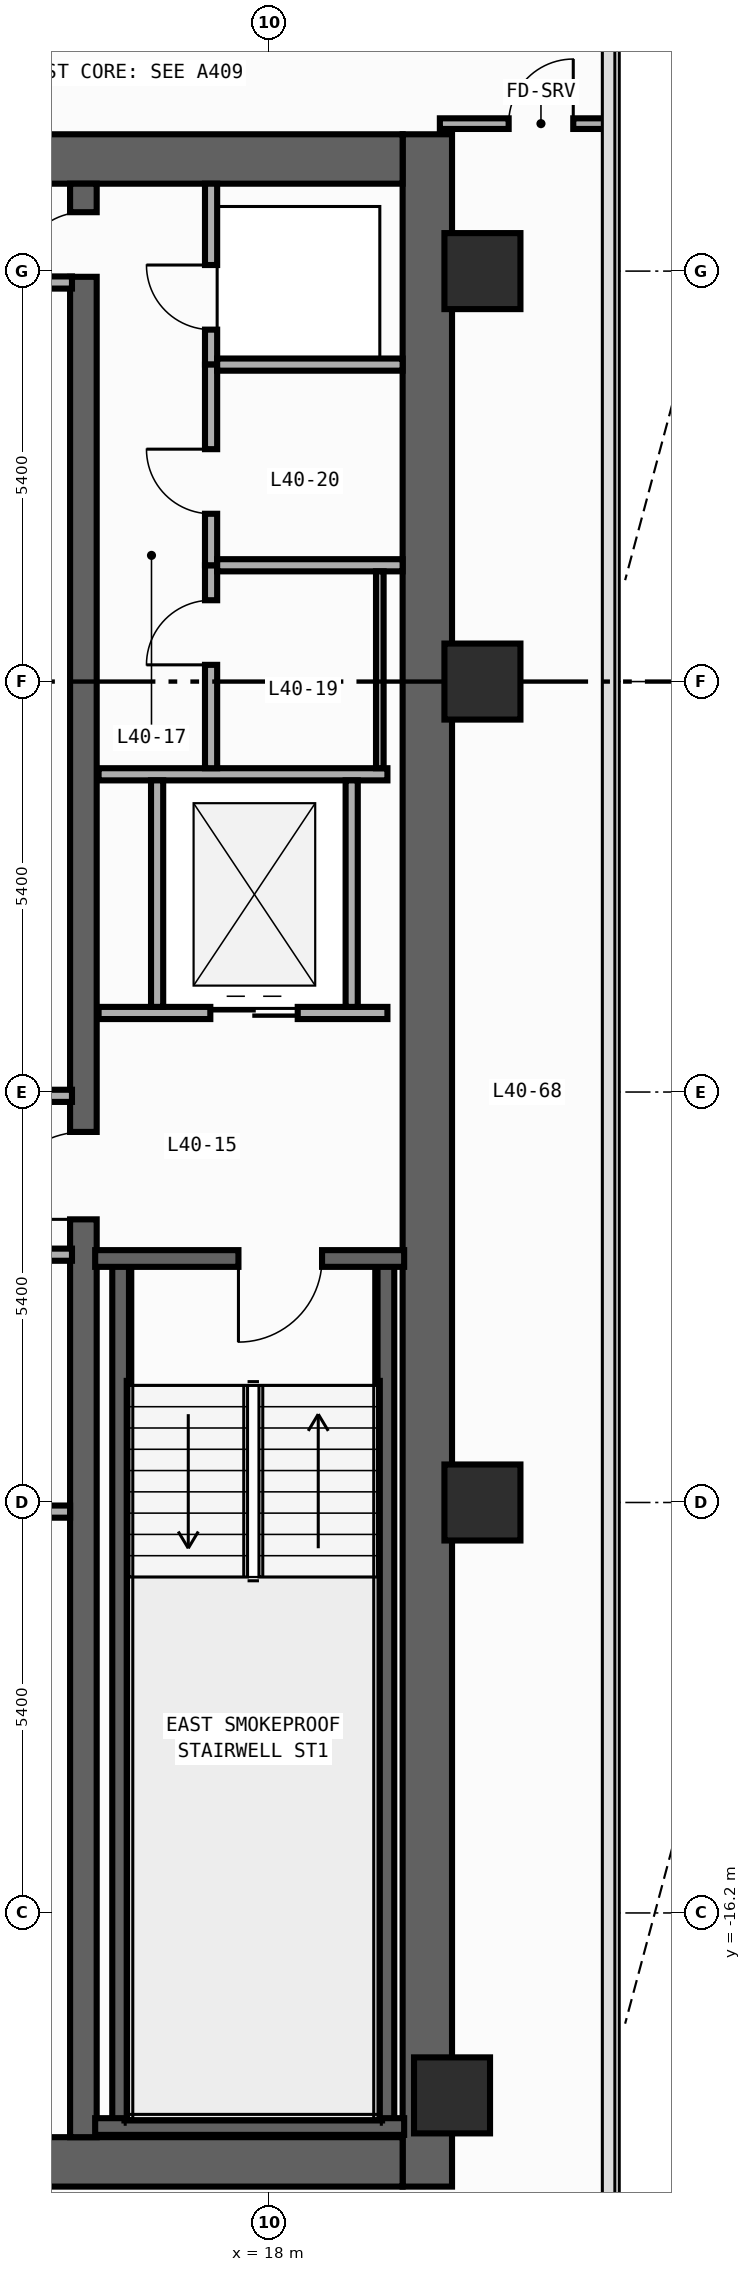
"""IFC4 building model, lengths in metres.
Left out: names, types, materials, properties, quantities, classifications, styles, units other than length and angle.
Written with IfcOpenShell. Run it as: python <this file> out.ifc"""

import sys

from ifc_helpers import new_model, si_unit, direction, frame, frame_2d, origin, origin_2d, place, context, subcontext, project, spatial, rectangle, extrude, element, fill, save


model = new_model("IFC4")
c1 = context("Model", 3, precision=1e-05, world=origin(), true_north=direction((0.0, 1.0)))
c2 = subcontext(c1, "Body", "Model", "MODEL_VIEW")
j1 = project(units=[si_unit("LENGTHUNIT", "METRE"), si_unit("PLANEANGLEUNIT", "RADIAN")], contexts=[c1])
p1 = place(None, origin())
s1 = spatial("IfcSite", under=j1, at=p1, CompositionType="ELEMENT")
p2 = place(p1, origin())
s2 = spatial("IfcBuilding", under=s1, at=p2, CompositionType="ELEMENT")
p3 = place(p2, frame((0.0, 0.0, 176.4)))
s3 = spatial("IfcBuildingStorey", under=s2, at=p3, CompositionType="ELEMENT", Elevation=176.4)
p4 = place(p3, frame((20.075, -19.8, 0.0), z_axis=(0.0, 0.0, 1.0), x_axis=(0.0, 1.0, 0.0)))
e1 = element("IfcWall", 1, at=p4, inside=s3, PredefinedType="SHEAR", context=c2, shape_type="SweptSolid", body=[
    extrude(rectangle(XDim=27.0, YDim=0.65, at=frame_2d((13.5, 0.0))), origin(), (0.0, 0.0, 1.0), 3.54),
])
for number, where, z_axis, x_axis in (
    (2, (12.65, -19.475, 0.0), (0.0, 0.0, 1.0), (1.0, 0.0, 0.0)),
    (3, (12.65, 6.875, 0.0), (0.0, 0.0, 1.0), (1.0, 0.0, 0.0)),
):
    element("IfcWall", number, at=place(p3, frame(where, z_axis=z_axis, x_axis=x_axis)), inside=s3, PredefinedType="SHEAR", context=c2, shape_type="SweptSolid", body=[
        extrude(rectangle(XDim=7.1, YDim=0.65, at=frame_2d((3.55, 0.0))), origin(), (0.0, 0.0, 1.0), 3.54),
    ])
p5 = place(p3, frame((15.55, -19.15, 0.0), z_axis=(0.0, 0.0, 1.0), x_axis=(0.0, 1.0, 0.0)))
e4 = element("IfcWall", 4, at=p5, inside=s3, PredefinedType="SHEAR", context=c2, shape_type="SweptSolid", body=[
    extrude(rectangle(XDim=25.7, YDim=0.35, at=frame_2d((12.85, 0.0))), origin(), (0.0, 0.0, 1.0), 3.54),
])
p6 = place(p5, frame((12.075, 0.0, 0.0)))
e5 = element("IfcOpeningElement", 5, at=p6, cuts=e4, PredefinedType="OPENING", context=c2, shape_type="SweptSolid", body=[
    extrude(rectangle(XDim=1.15, YDim=2.2, at=frame_2d((0.575, 1.1))), frame((0.0, 0.185, 0.0), z_axis=(0.0, -1.0, 0.0), x_axis=(1.0, 0.0, 0.0)), (0.0, 0.0, 1.0), 0.37),
])
p7 = place(p5, frame((24.475, 0.0, 0.0)))
e6 = element("IfcOpeningElement", 6, at=p7, cuts=e4, PredefinedType="OPENING", context=c2, shape_type="SweptSolid", body=[
    extrude(rectangle(XDim=0.85, YDim=2.1, at=frame_2d((0.425, 1.05))), frame((0.0, 0.185, 0.0), z_axis=(0.0, -1.0, 0.0), x_axis=(1.0, 0.0, 0.0)), (0.0, 0.0, 1.0), 0.37),
])
for number, where, z_axis, x_axis in (
    (7, (16.04, -19.01, 0.0), (0.0, 0.0, 1.0), (0.0, 1.0, 0.0)),
    (8, (19.53, -19.01, 0.0), (0.0, 0.0, 1.0), (0.0, 1.0, 0.0)),
):
    element("IfcWall", number, at=place(p3, frame(where, z_axis=z_axis, x_axis=x_axis)), inside=s3, PredefinedType="SHEAR", context=c2, shape_type="SweptSolid", body=[
        extrude(rectangle(XDim=11.42, YDim=0.22, at=frame_2d((5.71, 0.0))), origin(), (0.0, 0.0, 1.0), 3.54),
    ])
p8 = place(p3, frame((15.705, -19.01, 0.0), z_axis=(0.0, 0.0, 1.0), x_axis=(1.0, 0.0, 0.0)))
e9 = element("IfcWall", 9, at=p8, inside=s3, PredefinedType="SHEAR", context=c2, shape_type="SweptSolid", body=[
    extrude(rectangle(XDim=4.065, YDim=0.22, at=frame_2d((2.032, 0.0))), origin(), (0.0, 0.0, 1.0), 3.54),
])
p9 = place(p3, frame((19.77, -7.59, 0.0), z_axis=(0.0, 0.0, 1.0), x_axis=(-1.0, 0.0, 0.0)))
e10 = element("IfcWall", 10, at=p9, inside=s3, PredefinedType="SHEAR", context=c2, shape_type="SweptSolid", body=[
    extrude(rectangle(XDim=4.065, YDim=0.22, at=frame_2d((2.032, 0.0))), origin(), (0.0, 0.0, 1.0), 3.54),
])
p10 = place(p9, frame((1.08, 0.0, 0.0)))
e11 = element("IfcOpeningElement", 11, at=p10, cuts=e10, PredefinedType="OPENING", context=c2, shape_type="SweptSolid", body=[
    extrude(rectangle(XDim=1.1, YDim=2.2, at=frame_2d((0.55, 1.1))), frame((0.0, 0.12, 0.0), z_axis=(0.0, -1.0, 0.0), x_axis=(1.0, 0.0, 0.0)), (0.0, 0.0, 1.0), 0.24),
])
for number, where, z_axis, x_axis in (
    (12, (20.4, -18.6, 0.0), (0.0, 0.0, 1.0), (1.0, 0.0, 0.0)),
    (13, (20.8, -10.8, 0.0), (0.0, 0.0, 1.0), (1.0, 0.0, 0.0)),
    (14, (20.8, 0.0, 0.0), (0.0, 0.0, 1.0), (1.0, 0.0, 0.0)),
    (15, (20.8, 5.4, 0.0), (0.0, 0.0, 1.0), (1.0, 0.0, 0.0)),
):
    element("IfcColumn", number, at=place(p3, frame(where, z_axis=z_axis, x_axis=x_axis)), inside=s3, PredefinedType="COLUMN", context=c2, shape_type="SweptSolid", body=[
        extrude(rectangle(XDim=1.0, YDim=1.0, at=origin_2d()), origin(), (0.0, 0.0, 1.0), 3.8),
    ])
p11 = place(p3, frame((15.75, -4.36, 0.0), z_axis=(0.0, 0.0, 1.0), x_axis=(1.0, 0.0, 0.0)))
e16 = element("IfcWall", 16, at=p11, inside=s3, PredefinedType="STANDARD", context=c2, shape_type="SweptSolid", body=[
    extrude(rectangle(XDim=3.8, YDim=0.16, at=frame_2d((1.9, 0.0))), origin(), (0.0, 0.0, 1.0), 3.54),
])
p12 = place(p11, frame((1.47, 0.0, 0.0)))
e17 = element("IfcOpeningElement", 17, at=p12, cuts=e16, PredefinedType="OPENING", context=c2, shape_type="SweptSolid", body=[
    extrude(rectangle(XDim=1.15, YDim=2.2, at=frame_2d((0.575, 1.1))), frame((0.0, 0.09, 0.0), z_axis=(0.0, -1.0, 0.0), x_axis=(1.0, 0.0, 0.0)), (0.0, 0.0, 1.0), 0.18),
])
p13 = place(p3, frame((15.75, -1.22, 0.0), z_axis=(0.0, 0.0, 1.0), x_axis=(1.0, 0.0, 0.0)))
e18 = element("IfcWall", 18, at=p13, inside=s3, PredefinedType="STANDARD", context=c2, shape_type="SweptSolid", body=[
    extrude(rectangle(XDim=3.8, YDim=0.16, at=frame_2d((1.9, 0.0))), origin(), (0.0, 0.0, 1.0), 3.54),
])
for number, where, z_axis, x_axis in (
    (19, (16.52, -4.28, 0.0), (0.0, 0.0, 1.0), (0.0, 1.0, 0.0)),
    (20, (19.08, -4.28, 0.0), (0.0, 0.0, 1.0), (0.0, 1.0, 0.0)),
):
    element("IfcWall", number, at=place(p3, frame(where, z_axis=z_axis, x_axis=x_axis)), inside=s3, PredefinedType="STANDARD", context=c2, shape_type="SweptSolid", body=[
        extrude(rectangle(XDim=2.98, YDim=0.16, at=frame_2d((1.49, 0.0))), origin(), (0.0, 0.0, 1.0), 3.54),
    ])
for number, where, z_axis, x_axis in (
    (21, (12.8, -5.45, 0.0), (0.0, 0.0, 1.0), (1.0, 0.0, 0.0)),
    (22, (12.8, -7.54, 0.0), (0.0, 0.0, 1.0), (1.0, 0.0, 0.0)),
    (23, (12.8, 5.25, 0.0), (0.0, 0.0, 1.0), (1.0, 0.0, 0.0)),
):
    element("IfcWall", number, at=place(p3, frame(where, z_axis=z_axis, x_axis=x_axis)), inside=s3, PredefinedType="STANDARD", context=c2, shape_type="SweptSolid", body=[
        extrude(rectangle(XDim=2.6, YDim=0.16, at=frame_2d((1.3, 0.0))), origin(), (0.0, 0.0, 1.0), 3.54),
    ])
p14 = place(p3, frame((17.23, 4.17, 0.0), z_axis=(0.0, 0.0, 1.0), x_axis=(0.0, 1.0, 0.0)))
e24 = element("IfcWall", 24, at=p14, inside=s3, PredefinedType="PARTITIONING", context=c2, shape_type="SweptSolid", body=[
    extrude(rectangle(XDim=2.38, YDim=0.16, at=frame_2d((1.19, 0.0))), origin(), (0.0, 0.0, 1.0), 3.54),
])
p15 = place(p14, frame((0.46, 0.0, 0.0)))
e25 = element("IfcOpeningElement", 25, at=p15, cuts=e24, PredefinedType="OPENING", context=c2, shape_type="SweptSolid", body=[
    extrude(rectangle(XDim=0.85, YDim=2.1, at=frame_2d((0.425, 1.05))), frame((0.0, 0.09, 0.0), z_axis=(0.0, -1.0, 0.0), x_axis=(1.0, 0.0, 0.0)), (0.0, 0.0, 1.0), 0.18),
])
p16 = place(p3, frame((17.23, -1.14, 0.0), z_axis=(0.0, 0.0, 1.0), x_axis=(0.0, 1.0, 0.0)))
e26 = element("IfcWall", 26, at=p16, inside=s3, PredefinedType="PARTITIONING", context=c2, shape_type="SweptSolid", body=[
    extrude(rectangle(XDim=2.67, YDim=0.16, at=frame_2d((1.335, 0.0))), origin(), (0.0, 0.0, 1.0), 3.54),
])
p17 = place(p16, frame((1.36, 0.0, 0.0)))
e27 = element("IfcOpeningElement", 27, at=p17, cuts=e26, PredefinedType="OPENING", context=c2, shape_type="SweptSolid", body=[
    extrude(rectangle(XDim=0.85, YDim=2.1, at=frame_2d((0.425, 1.05))), frame((0.0, 0.09, 0.0), z_axis=(0.0, -1.0, 0.0), x_axis=(1.0, 0.0, 0.0)), (0.0, 0.0, 1.0), 0.18),
])
p18 = place(p3, frame((17.23, 1.53, 0.0), z_axis=(0.0, 0.0, 1.0), x_axis=(0.0, 1.0, 0.0)))
e28 = element("IfcWall", 28, at=p18, inside=s3, PredefinedType="PARTITIONING", context=c2, shape_type="SweptSolid", body=[
    extrude(rectangle(XDim=2.64, YDim=0.16, at=frame_2d((1.32, 0.0))), origin(), (0.0, 0.0, 1.0), 3.54),
])
p19 = place(p18, frame((0.677, 0.0, 0.0)))
e29 = element("IfcOpeningElement", 29, at=p19, cuts=e28, PredefinedType="OPENING", context=c2, shape_type="SweptSolid", body=[
    extrude(rectangle(XDim=0.85, YDim=2.1, at=frame_2d((0.425, 1.05))), frame((0.0, 0.09, 0.0), z_axis=(0.0, -1.0, 0.0), x_axis=(1.0, 0.0, 0.0)), (0.0, 0.0, 1.0), 0.18),
])
for number, where, z_axis, x_axis in (
    (30, (17.31, 4.17, 0.0), (0.0, 0.0, 1.0), (1.0, 0.0, 0.0)),
    (31, (17.31, 1.53, 0.0), (0.0, 0.0, 1.0), (1.0, 0.0, 0.0)),
):
    element("IfcWall", number, at=place(p3, frame(where, z_axis=z_axis, x_axis=x_axis)), inside=s3, PredefinedType="PARTITIONING", context=c2, shape_type="SweptSolid", body=[
        extrude(rectangle(XDim=2.44, YDim=0.16, at=frame_2d((1.22, 0.0))), origin(), (0.0, 0.0, 1.0), 3.54),
    ])
p20 = place(p3, frame((12.31, -10.92, 0.0), z_axis=(0.0, 0.0, 1.0), x_axis=(1.0, 0.0, 0.0)))
e32 = element("IfcWall", 32, at=p20, inside=s3, PredefinedType="PARTITIONING", context=c2, shape_type="SweptSolid", body=[
    extrude(rectangle(XDim=3.065, YDim=0.16, at=frame_2d((1.532, 0.0))), origin(), (0.0, 0.0, 1.0), 2.952),
])
p21 = place(p3, frame((20.24, 7.34, 0.0), z_axis=(0.0, 0.0, 1.0), x_axis=(1.0, 0.0, 0.0)))
e33 = element("IfcWall", 33, at=p21, inside=s3, PredefinedType="PARTITIONING", context=c2, shape_type="SweptSolid", body=[
    extrude(rectangle(XDim=2.215, YDim=0.14, at=frame_2d((1.107, 0.0))), origin(), (0.0, 0.0, 1.0), 3.54),
])
p22 = place(p21, frame((0.905, 0.0, 0.0)))
e34 = element("IfcOpeningElement", 34, at=p22, cuts=e33, PredefinedType="OPENING", context=c2, shape_type="SweptSolid", body=[
    extrude(rectangle(XDim=0.85, YDim=2.1, at=frame_2d((0.425, 1.05))), frame((0.0, 0.08, 0.0), z_axis=(0.0, -1.0, 0.0), x_axis=(1.0, 0.0, 0.0)), (0.0, 0.0, 1.0), 0.16),
])
p23 = place(p3, frame((19.45, 1.45, 0.0), z_axis=(0.0, 0.0, 1.0), x_axis=(0.0, -1.0, 0.0)))
e35 = element("IfcWall", 35, at=p23, inside=s3, PredefinedType="PARTITIONING", context=c2, shape_type="SweptSolid", body=[
    extrude(rectangle(XDim=2.59, YDim=0.1, at=frame_2d((1.295, 0.0))), origin(), (0.0, 0.0, 1.0), 3.54),
])
p24 = place(p10, origin())
e36 = element("IfcDoor", 36, at=p24, inside=s3, OperationType="SINGLE_SWING_RIGHT", PredefinedType="DOOR", context=c2, shape_type="SweptSolid", body=[
    extrude(rectangle(XDim=1.1, YDim=2.2, at=frame_2d((0.55, 1.1))), frame((0.0, 0.025, 0.0), z_axis=(0.0, -1.0, 0.0), x_axis=(1.0, 0.0, 0.0)), (0.0, 0.0, 1.0), 0.05),
])
fill(e11, e36)
p25 = place(p6, origin())
e37 = element("IfcDoor", 37, at=p25, inside=s3, OperationType="SINGLE_SWING_LEFT", PredefinedType="DOOR", context=c2, shape_type="SweptSolid", body=[
    extrude(rectangle(XDim=1.15, YDim=2.2, at=frame_2d((0.575, 1.1))), frame((0.0, 0.025, 0.0), z_axis=(0.0, -1.0, 0.0), x_axis=(1.0, 0.0, 0.0)), (0.0, 0.0, 1.0), 0.05),
])
fill(e5, e37)
p26 = place(p7, origin())
e38 = element("IfcDoor", 38, at=p26, inside=s3, OperationType="SINGLE_SWING_LEFT", PredefinedType="DOOR", context=c2, shape_type="SweptSolid", body=[
    extrude(rectangle(XDim=0.85, YDim=2.1, at=frame_2d((0.425, 1.05))), frame((0.0, 0.025, 0.0), z_axis=(0.0, -1.0, 0.0), x_axis=(1.0, 0.0, 0.0)), (0.0, 0.0, 1.0), 0.05),
])
fill(e6, e38)
p27 = place(p12, origin())
e39 = element("IfcDoor", 39, at=p27, inside=s3, OperationType="DOUBLE_DOOR_SLIDING", PredefinedType="DOOR", context=c2, shape_type="SweptSolid", body=[
    extrude(rectangle(XDim=1.15, YDim=2.2, at=frame_2d((0.575, 1.1))), frame((0.0, 0.025, 0.0), z_axis=(0.0, -1.0, 0.0), x_axis=(1.0, 0.0, 0.0)), (0.0, 0.0, 1.0), 0.05),
])
fill(e17, e39)
p28 = place(p15, origin())
e40 = element("IfcDoor", 40, at=p28, inside=s3, OperationType="SINGLE_SWING_RIGHT", PredefinedType="DOOR", context=c2, shape_type="SweptSolid", body=[
    extrude(rectangle(XDim=0.85, YDim=2.1, at=frame_2d((0.425, 1.05))), frame((0.0, 0.025, 0.0), z_axis=(0.0, -1.0, 0.0), x_axis=(1.0, 0.0, 0.0)), (0.0, 0.0, 1.0), 0.05),
])
fill(e25, e40)
p29 = place(p17, origin())
e41 = element("IfcDoor", 41, at=p29, inside=s3, OperationType="SINGLE_SWING_LEFT", PredefinedType="DOOR", context=c2, shape_type="SweptSolid", body=[
    extrude(rectangle(XDim=0.85, YDim=2.1, at=frame_2d((0.425, 1.05))), frame((0.0, 0.025, 0.0), z_axis=(0.0, -1.0, 0.0), x_axis=(1.0, 0.0, 0.0)), (0.0, 0.0, 1.0), 0.05),
])
fill(e27, e41)
p30 = place(p19, origin())
e42 = element("IfcDoor", 42, at=p30, inside=s3, OperationType="SINGLE_SWING_RIGHT", PredefinedType="DOOR", context=c2, shape_type="SweptSolid", body=[
    extrude(rectangle(XDim=0.85, YDim=2.1, at=frame_2d((0.425, 1.05))), frame((0.0, 0.025, 0.0), z_axis=(0.0, -1.0, 0.0), x_axis=(1.0, 0.0, 0.0)), (0.0, 0.0, 1.0), 0.05),
])
fill(e29, e42)
p31 = place(p22, origin())
e43 = element("IfcDoor", 43, at=p31, inside=s3, OperationType="SINGLE_SWING_RIGHT", PredefinedType="DOOR", context=c2, shape_type="SweptSolid", body=[
    extrude(rectangle(XDim=0.85, YDim=2.1, at=frame_2d((0.425, 1.05))), frame((0.0, 0.025, 0.0), z_axis=(0.0, -1.0, 0.0), x_axis=(1.0, 0.0, 0.0)), (0.0, 0.0, 1.0), 0.05),
])
fill(e34, e43)
save(model, sys.argv[1])
